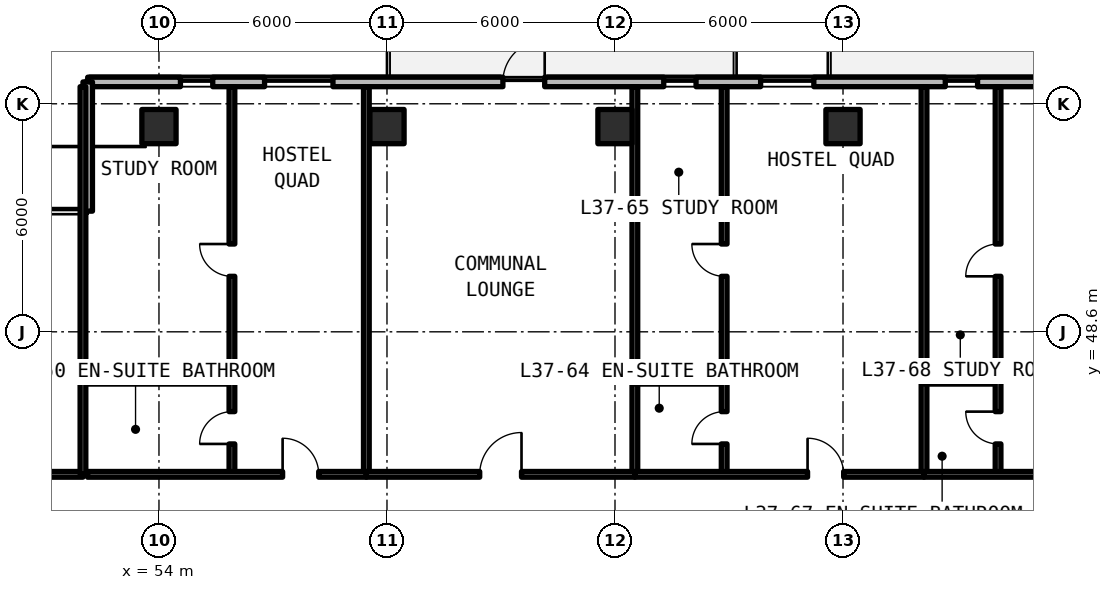
"""IFC4 building model, lengths in metres.
Left out: names, types, materials, properties, quantities, classifications, styles, units other than length and angle.
Written with IfcOpenShell. Run it as: python <this file> out.ifc"""

import sys

from ifc_helpers import new_model, si_unit, direction, frame, frame_2d, origin, origin_2d, place, context, subcontext, project, spatial, rectangle, extrude, element, fill, save


model = new_model("IFC4")
c1 = context("Model", 3, precision=1e-05, world=origin(), true_north=direction((0.0, 1.0)))
c2 = subcontext(c1, "Body", "Model", "MODEL_VIEW")
j1 = project(units=[si_unit("LENGTHUNIT", "METRE"), si_unit("PLANEANGLEUNIT", "RADIAN")], contexts=[c1])
p1 = place(None, origin())
s1 = spatial("IfcSite", under=j1, at=p1, CompositionType="ELEMENT")
p2 = place(p1, origin())
s2 = spatial("IfcBuilding", under=s1, at=p2, CompositionType="ELEMENT")
p3 = place(p2, frame((0.0, 0.0, 135.3)))
s3 = spatial("IfcBuildingStorey", under=s2, at=p3, CompositionType="ELEMENT", Elevation=135.3)
for number, where, z_axis, x_axis in (
    (1, (54.0, 54.0, 0.0), (0.0, 0.0, 1.0), (1.0, 0.0, 0.0)),
    (2, (60.0, 54.0, 0.0), (0.0, 0.0, 1.0), (1.0, 0.0, 0.0)),
    (3, (66.0, 54.0, 0.0), (0.0, 0.0, 1.0), (1.0, 0.0, 0.0)),
    (4, (72.0, 54.0, 0.0), (0.0, 0.0, 1.0), (1.0, 0.0, 0.0)),
):
    element("IfcColumn", number, at=place(p3, frame(where, z_axis=z_axis, x_axis=x_axis)), inside=s3, PredefinedType="COLUMN", context=c2, shape_type="SweptSolid", body=[
        extrude(rectangle(XDim=0.9, YDim=0.9, at=origin_2d()), origin(), (0.0, 0.0, 1.0), 3.3),
    ])
p4 = place(p3, frame((95.748, 55.175, 0.0), z_axis=(0.0, 0.0, 1.0), x_axis=(-1.0, 0.0, 0.0)))
e5 = element("IfcWall", 5, at=p4, inside=s3, PredefinedType="SOLIDWALL", context=c2, shape_type="SweptSolid", body=[
    extrude(rectangle(XDim=43.623, YDim=0.25, at=frame_2d((21.812, 0.0))), origin(), (0.0, 0.0, 1.0), 3.08),
])
p5 = place(p4, frame((31.598, 0.0, 0.0)))
e6 = element("IfcOpeningElement", 6, at=p5, cuts=e5, PredefinedType="OPENING", context=c2, shape_type="SweptSolid", body=[
    extrude(rectangle(XDim=1.1, YDim=2.15, at=frame_2d((0.55, 1.075))), frame((0.0, 0.135, 0.0), z_axis=(0.0, -1.0, 0.0), x_axis=(1.0, 0.0, 0.0)), (0.0, 0.0, 1.0), 0.27),
])
p6 = place(p4, frame((15.398, 0.0, 0.0)))
e7 = element("IfcOpeningElement", 7, at=p6, cuts=e5, PredefinedType="OPENING", context=c2, shape_type="SweptSolid", body=[
    extrude(rectangle(XDim=1.1, YDim=2.15, at=frame_2d((0.55, 1.075))), frame((0.0, 0.135, 0.0), z_axis=(0.0, -1.0, 0.0), x_axis=(1.0, 0.0, 0.0)), (0.0, 0.0, 1.0), 0.27),
])
p7 = place(p4, frame((40.333, 0.0, 0.78)))
e8 = element("IfcOpeningElement", 8, at=p7, cuts=e5, PredefinedType="OPENING", context=c2, shape_type="SweptSolid", body=[
    extrude(rectangle(XDim=0.85, YDim=1.65, at=frame_2d((0.425, 0.825))), frame((0.0, 0.135, 0.0), z_axis=(0.0, -1.0, 0.0), x_axis=(1.0, 0.0, 0.0)), (0.0, 0.0, 1.0), 0.27),
])
p8 = place(p4, frame((37.17, 0.0, 0.78)))
e9 = element("IfcOpeningElement", 9, at=p8, cuts=e5, PredefinedType="OPENING", context=c2, shape_type="SweptSolid", body=[
    extrude(rectangle(XDim=1.8, YDim=1.66, at=frame_2d((0.9, 0.83))), frame((0.0, 0.135, 0.0), z_axis=(0.0, -1.0, 0.0), x_axis=(1.0, 0.0, 0.0)), (0.0, 0.0, 1.0), 0.27),
])
p9 = place(p4, frame((27.615, 0.0, 0.78)))
e10 = element("IfcOpeningElement", 10, at=p9, cuts=e5, PredefinedType="OPENING", context=c2, shape_type="SweptSolid", body=[
    extrude(rectangle(XDim=0.85, YDim=1.65, at=frame_2d((0.425, 0.825))), frame((0.0, 0.135, 0.0), z_axis=(0.0, -1.0, 0.0), x_axis=(1.0, 0.0, 0.0)), (0.0, 0.0, 1.0), 0.27),
])
p10 = place(p4, frame((24.516, 0.0, 0.78)))
e11 = element("IfcOpeningElement", 11, at=p10, cuts=e5, PredefinedType="OPENING", context=c2, shape_type="SweptSolid", body=[
    extrude(rectangle(XDim=1.4, YDim=1.65, at=frame_2d((0.7, 0.825))), frame((0.0, 0.135, 0.0), z_axis=(0.0, -1.0, 0.0), x_axis=(1.0, 0.0, 0.0)), (0.0, 0.0, 1.0), 0.27),
])
p11 = place(p4, frame((20.208, 0.0, 0.78)))
e12 = element("IfcOpeningElement", 12, at=p11, cuts=e5, PredefinedType="OPENING", context=c2, shape_type="SweptSolid", body=[
    extrude(rectangle(XDim=0.85, YDim=1.65, at=frame_2d((0.425, 0.825))), frame((0.0, 0.135, 0.0), z_axis=(0.0, -1.0, 0.0), x_axis=(1.0, 0.0, 0.0)), (0.0, 0.0, 1.0), 0.27),
])
p12 = place(p4, frame((12.6, 0.0, 0.78)))
e13 = element("IfcOpeningElement", 13, at=p12, cuts=e5, PredefinedType="OPENING", context=c2, shape_type="SweptSolid", body=[
    extrude(rectangle(XDim=1.4, YDim=1.65, at=frame_2d((0.7, 0.825))), frame((0.0, 0.135, 0.0), z_axis=(0.0, -1.0, 0.0), x_axis=(1.0, 0.0, 0.0)), (0.0, 0.0, 1.0), 0.27),
])
p13 = place(p4, frame((7.831, 0.0, 0.78)))
e14 = element("IfcOpeningElement", 14, at=p13, cuts=e5, PredefinedType="OPENING", context=c2, shape_type="SweptSolid", body=[
    extrude(rectangle(XDim=1.4, YDim=1.65, at=frame_2d((0.7, 0.825))), frame((0.0, 0.135, 0.0), z_axis=(0.0, -1.0, 0.0), x_axis=(1.0, 0.0, 0.0)), (0.0, 0.0, 1.0), 0.27),
])
p14 = place(p4, frame((4.286, 0.0, 0.78)))
e15 = element("IfcOpeningElement", 15, at=p14, cuts=e5, PredefinedType="OPENING", context=c2, shape_type="SweptSolid", body=[
    extrude(rectangle(XDim=0.85, YDim=1.65, at=frame_2d((0.425, 0.825))), frame((0.0, 0.135, 0.0), z_axis=(0.0, -1.0, 0.0), x_axis=(1.0, 0.0, 0.0)), (0.0, 0.0, 1.0), 0.27),
])
p15 = place(p4, frame((1.098, 0.0, 0.78)))
e16 = element("IfcOpeningElement", 16, at=p15, cuts=e5, PredefinedType="OPENING", context=c2, shape_type="SweptSolid", body=[
    extrude(rectangle(XDim=1.8, YDim=1.66, at=frame_2d((0.9, 0.83))), frame((0.0, 0.135, 0.0), z_axis=(0.0, -1.0, 0.0), x_axis=(1.0, 0.0, 0.0)), (0.0, 0.0, 1.0), 0.27),
])
p16 = place(p3, frame((52.125, 55.175, 0.0), z_axis=(0.0, 0.0, 1.0), x_axis=(0.0, -1.0, 0.0)))
e17 = element("IfcWall", 17, at=p16, inside=s3, PredefinedType="SOLIDWALL", context=c2, shape_type="SweptSolid", body=[
    extrude(rectangle(XDim=3.4, YDim=0.25, at=frame_2d((1.7, 0.0))), origin(), (0.0, 0.0, 1.0), 3.08),
])
p17 = place(p3, frame((43.6, 44.85, 0.0), z_axis=(0.0, 0.0, 1.0), x_axis=(1.0, 0.0, 0.0)))
e18 = element("IfcWall", 18, at=p17, inside=s3, PredefinedType="SOLIDWALL", context=c2, shape_type="SweptSolid", body=[
    extrude(rectangle(XDim=8.4, YDim=0.15, at=frame_2d((4.2, 0.0))), origin(), (0.0, 0.0, 1.0), 2.35),
])
p18 = place(p17, frame((3.65, 0.0, 0.0)))
e19 = element("IfcOpeningElement", 19, at=p18, cuts=e18, PredefinedType="OPENING", context=c2, shape_type="SweptSolid", body=[
    extrude(rectangle(XDim=1.1, YDim=2.15, at=frame_2d((0.55, 1.075))), frame((0.0, 0.085, 0.0), z_axis=(0.0, -1.0, 0.0), x_axis=(1.0, 0.0, 0.0)), (0.0, 0.0, 1.0), 0.17),
])
for number, where, z_axis, x_axis in (
    (20, (52.0, 44.85, 0.0), (0.0, 0.0, 1.0), (0.0, 1.0, 0.0)),
    (21, (59.457, 44.85, 0.0), (0.0, 0.0, 1.0), (0.0, 1.0, 0.0)),
):
    element("IfcWall", number, at=place(p3, frame(where, z_axis=z_axis, x_axis=x_axis)), inside=s3, PredefinedType="SOLIDWALL", context=c2, shape_type="SweptSolid", body=[
        extrude(rectangle(XDim=10.2, YDim=0.15, at=frame_2d((5.1, 0.0))), origin(), (0.0, 0.0, 1.0), 2.35),
    ])
p19 = place(p3, frame((52.12, 47.3, 0.0), z_axis=(0.0, 0.0, 1.0), x_axis=(1.0, 0.0, 0.0)))
e22 = element("IfcWall", 22, at=p19, inside=s3, PredefinedType="PARTITIONING", context=c2, shape_type="SweptSolid", body=[
    extrude(rectangle(XDim=3.8, YDim=0.15, at=frame_2d((1.9, 0.0))), origin(), (0.0, 0.0, 1.0), 2.35),
])
p20 = place(p3, frame((55.92, 44.85, 0.0), z_axis=(0.0, 0.0, 1.0), x_axis=(0.0, 1.0, 0.0)))
e23 = element("IfcWall", 23, at=p20, inside=s3, PredefinedType="PARTITIONING", context=c2, shape_type="SweptSolid", body=[
    extrude(rectangle(XDim=10.2, YDim=0.15, at=frame_2d((5.1, 0.0))), origin(), (0.0, 0.0, 1.0), 2.35),
])
p21 = place(p20, frame((0.8, 0.0, 0.0)))
e24 = element("IfcOpeningElement", 24, at=p21, cuts=e23, PredefinedType="OPENING", context=c2, shape_type="SweptSolid", body=[
    extrude(rectangle(XDim=0.85, YDim=2.1, at=frame_2d((0.425, 1.05))), frame((0.0, 0.085, 0.0), z_axis=(0.0, -1.0, 0.0), x_axis=(1.0, 0.0, 0.0)), (0.0, 0.0, 1.0), 0.17),
])
p22 = place(p20, frame((5.21, 0.0, 0.0)))
e25 = element("IfcOpeningElement", 25, at=p22, cuts=e23, PredefinedType="OPENING", context=c2, shape_type="SweptSolid", body=[
    extrude(rectangle(XDim=0.85, YDim=2.1, at=frame_2d((0.425, 1.05))), frame((0.0, 0.085, 0.0), z_axis=(0.0, -1.0, 0.0), x_axis=(1.0, 0.0, 0.0)), (0.0, 0.0, 1.0), 0.17),
])
p23 = place(p3, frame((52.12, 44.85, 0.0), z_axis=(0.0, 0.0, 1.0), x_axis=(1.0, 0.0, 0.0)))
e26 = element("IfcWall", 26, at=p23, inside=s3, PredefinedType="SOLIDWALL", context=c2, shape_type="SweptSolid", body=[
    extrude(rectangle(XDim=7.337, YDim=0.15, at=frame_2d((3.668, 0.0))), origin(), (0.0, 0.0, 1.0), 2.35),
])
p24 = place(p23, frame((5.134, 0.0, 0.0)))
e27 = element("IfcOpeningElement", 27, at=p24, cuts=e26, PredefinedType="OPENING", context=c2, shape_type="SweptSolid", body=[
    extrude(rectangle(XDim=0.95, YDim=2.15, at=frame_2d((0.475, 1.075))), frame((0.0, 0.085, 0.0), z_axis=(0.0, -1.0, 0.0), x_axis=(1.0, 0.0, 0.0)), (0.0, 0.0, 1.0), 0.17),
])
p25 = place(p3, frame((66.523, 44.85, 0.0), z_axis=(0.0, 0.0, 1.0), x_axis=(0.0, 1.0, 0.0)))
e28 = element("IfcWall", 28, at=p25, inside=s3, PredefinedType="SOLIDWALL", context=c2, shape_type="SweptSolid", body=[
    extrude(rectangle(XDim=10.2, YDim=0.15, at=frame_2d((5.1, 0.0))), origin(), (0.0, 0.0, 1.0), 2.35),
])
p26 = place(p3, frame((59.457, 44.85, 0.0), z_axis=(0.0, 0.0, 1.0), x_axis=(1.0, 0.0, 0.0)))
e29 = element("IfcWall", 29, at=p26, inside=s3, PredefinedType="SOLIDWALL", context=c2, shape_type="SweptSolid", body=[
    extrude(rectangle(XDim=7.065, YDim=0.15, at=frame_2d((3.533, 0.0))), origin(), (0.0, 0.0, 1.0), 2.35),
])
p27 = place(p26, frame((2.983, 0.0, 0.0)))
e30 = element("IfcOpeningElement", 30, at=p27, cuts=e29, PredefinedType="OPENING", context=c2, shape_type="SweptSolid", body=[
    extrude(rectangle(XDim=1.1, YDim=2.15, at=frame_2d((0.55, 1.075))), frame((0.0, 0.085, 0.0), z_axis=(0.0, -1.0, 0.0), x_axis=(1.0, 0.0, 0.0)), (0.0, 0.0, 1.0), 0.17),
])
p28 = place(p3, frame((74.132, 44.85, 0.0), z_axis=(0.0, 0.0, 1.0), x_axis=(0.0, 1.0, 0.0)))
e31 = element("IfcWall", 31, at=p28, inside=s3, PredefinedType="SOLIDWALL", context=c2, shape_type="SweptSolid", body=[
    extrude(rectangle(XDim=10.2, YDim=0.15, at=frame_2d((5.1, 0.0))), origin(), (0.0, 0.0, 1.0), 2.35),
])
p29 = place(p3, frame((66.523, 47.3, 0.0), z_axis=(0.0, 0.0, 1.0), x_axis=(1.0, 0.0, 0.0)))
e32 = element("IfcWall", 32, at=p29, inside=s3, PredefinedType="PARTITIONING", context=c2, shape_type="SweptSolid", body=[
    extrude(rectangle(XDim=2.35, YDim=0.15, at=frame_2d((1.175, 0.0))), origin(), (0.0, 0.0, 1.0), 2.35),
])
p30 = place(p3, frame((68.873, 44.85, 0.0), z_axis=(0.0, 0.0, 1.0), x_axis=(0.0, 1.0, 0.0)))
e33 = element("IfcWall", 33, at=p30, inside=s3, PredefinedType="PARTITIONING", context=c2, shape_type="SweptSolid", body=[
    extrude(rectangle(XDim=10.2, YDim=0.15, at=frame_2d((5.1, 0.0))), origin(), (0.0, 0.0, 1.0), 2.35),
])
p31 = place(p30, frame((0.8, 0.0, 0.0)))
e34 = element("IfcOpeningElement", 34, at=p31, cuts=e33, PredefinedType="OPENING", context=c2, shape_type="SweptSolid", body=[
    extrude(rectangle(XDim=0.85, YDim=2.1, at=frame_2d((0.425, 1.05))), frame((0.0, 0.085, 0.0), z_axis=(0.0, -1.0, 0.0), x_axis=(1.0, 0.0, 0.0)), (0.0, 0.0, 1.0), 0.17),
])
p32 = place(p30, frame((5.21, 0.0, 0.0)))
e35 = element("IfcOpeningElement", 35, at=p32, cuts=e33, PredefinedType="OPENING", context=c2, shape_type="SweptSolid", body=[
    extrude(rectangle(XDim=0.85, YDim=2.1, at=frame_2d((0.425, 1.05))), frame((0.0, 0.085, 0.0), z_axis=(0.0, -1.0, 0.0), x_axis=(1.0, 0.0, 0.0)), (0.0, 0.0, 1.0), 0.17),
])
p33 = place(p3, frame((66.523, 44.85, 0.0), z_axis=(0.0, 0.0, 1.0), x_axis=(1.0, 0.0, 0.0)))
e36 = element("IfcWall", 36, at=p33, inside=s3, PredefinedType="SOLIDWALL", context=c2, shape_type="SweptSolid", body=[
    extrude(rectangle(XDim=7.609, YDim=0.15, at=frame_2d((3.804, 0.0))), origin(), (0.0, 0.0, 1.0), 2.35),
])
p34 = place(p33, frame((4.544, 0.0, 0.0)))
e37 = element("IfcOpeningElement", 37, at=p34, cuts=e36, PredefinedType="OPENING", context=c2, shape_type="SweptSolid", body=[
    extrude(rectangle(XDim=0.95, YDim=2.15, at=frame_2d((0.475, 1.075))), frame((0.0, 0.085, 0.0), z_axis=(0.0, -1.0, 0.0), x_axis=(1.0, 0.0, 0.0)), (0.0, 0.0, 1.0), 0.17),
])
p35 = place(p3, frame((74.132, 47.3, 0.0), z_axis=(0.0, 0.0, 1.0), x_axis=(1.0, 0.0, 0.0)))
e38 = element("IfcWall", 38, at=p35, inside=s3, PredefinedType="PARTITIONING", context=c2, shape_type="SweptSolid", body=[
    extrude(rectangle(XDim=1.948, YDim=0.15, at=frame_2d((0.974, 0.0))), origin(), (0.0, 0.0, 1.0), 2.35),
])
p36 = place(p3, frame((76.08, 44.85, 0.0), z_axis=(0.0, 0.0, 1.0), x_axis=(0.0, 1.0, 0.0)))
e39 = element("IfcWall", 39, at=p36, inside=s3, PredefinedType="PARTITIONING", context=c2, shape_type="SweptSolid", body=[
    extrude(rectangle(XDim=10.2, YDim=0.15, at=frame_2d((5.1, 0.0))), origin(), (0.0, 0.0, 1.0), 2.35),
])
p37 = place(p36, frame((0.8, 0.0, 0.0)))
e40 = element("IfcOpeningElement", 40, at=p37, cuts=e39, PredefinedType="OPENING", context=c2, shape_type="SweptSolid", body=[
    extrude(rectangle(XDim=0.85, YDim=2.1, at=frame_2d((0.425, 1.05))), frame((0.0, 0.085, 0.0), z_axis=(0.0, -1.0, 0.0), x_axis=(1.0, 0.0, 0.0)), (0.0, 0.0, 1.0), 0.17),
])
p38 = place(p36, frame((5.21, 0.0, 0.0)))
e41 = element("IfcOpeningElement", 41, at=p38, cuts=e39, PredefinedType="OPENING", context=c2, shape_type="SweptSolid", body=[
    extrude(rectangle(XDim=0.85, YDim=2.1, at=frame_2d((0.425, 1.05))), frame((0.0, 0.085, 0.0), z_axis=(0.0, -1.0, 0.0), x_axis=(1.0, 0.0, 0.0)), (0.0, 0.0, 1.0), 0.17),
])
p39 = place(p3, frame((74.132, 44.85, 0.0), z_axis=(0.0, 0.0, 1.0), x_axis=(1.0, 0.0, 0.0)))
e42 = element("IfcWall", 42, at=p39, inside=s3, PredefinedType="SOLIDWALL", context=c2, shape_type="SweptSolid", body=[
    extrude(rectangle(XDim=7.066, YDim=0.15, at=frame_2d((3.533, 0.0))), origin(), (0.0, 0.0, 1.0), 2.35),
])
p40 = place(p39, frame((4.072, 0.0, 0.0)))
e43 = element("IfcOpeningElement", 43, at=p40, cuts=e42, PredefinedType="OPENING", context=c2, shape_type="SweptSolid", body=[
    extrude(rectangle(XDim=0.95, YDim=2.15, at=frame_2d((0.475, 1.075))), frame((0.0, 0.085, 0.0), z_axis=(0.0, -1.0, 0.0), x_axis=(1.0, 0.0, 0.0)), (0.0, 0.0, 1.0), 0.17),
])
p41 = place(p5, frame((1.1, 0.0, 0.0), z_axis=(0.0, 0.0, 1.0), x_axis=(-1.0, 0.0, 0.0)))
e44 = element("IfcDoor", 44, at=p41, inside=s3, OperationType="SINGLE_SWING_RIGHT", PredefinedType="DOOR", context=c2, shape_type="SweptSolid", body=[
    extrude(rectangle(XDim=1.1, YDim=2.15, at=frame_2d((0.55, 1.075))), frame((0.0, 0.025, 0.0), z_axis=(0.0, -1.0, 0.0), x_axis=(1.0, 0.0, 0.0)), (0.0, 0.0, 1.0), 0.05),
])
fill(e6, e44)
p42 = place(p7, origin())
e45 = element("IfcWindow", 45, at=p42, inside=s3, PartitioningType="SINGLE_PANEL", PredefinedType="WINDOW", context=c2, shape_type="SweptSolid", body=[
    extrude(rectangle(XDim=0.85, YDim=1.65, at=frame_2d((0.425, 0.825))), frame((0.0, 0.03, 0.0), z_axis=(0.0, -1.0, 0.0), x_axis=(1.0, 0.0, 0.0)), (0.0, 0.0, 1.0), 0.06),
])
fill(e8, e45)
p43 = place(p8, origin())
e46 = element("IfcWindow", 46, at=p43, inside=s3, PartitioningType="SINGLE_PANEL", PredefinedType="WINDOW", context=c2, shape_type="SweptSolid", body=[
    extrude(rectangle(XDim=1.8, YDim=1.66, at=frame_2d((0.9, 0.83))), frame((0.0, 0.03, 0.0), z_axis=(0.0, -1.0, 0.0), x_axis=(1.0, 0.0, 0.0)), (0.0, 0.0, 1.0), 0.06),
])
fill(e9, e46)
p44 = place(p9, origin())
e47 = element("IfcWindow", 47, at=p44, inside=s3, PartitioningType="SINGLE_PANEL", PredefinedType="WINDOW", context=c2, shape_type="SweptSolid", body=[
    extrude(rectangle(XDim=0.85, YDim=1.65, at=frame_2d((0.425, 0.825))), frame((0.0, 0.03, 0.0), z_axis=(0.0, -1.0, 0.0), x_axis=(1.0, 0.0, 0.0)), (0.0, 0.0, 1.0), 0.06),
])
fill(e10, e47)
p45 = place(p10, origin())
e48 = element("IfcWindow", 48, at=p45, inside=s3, PartitioningType="SINGLE_PANEL", PredefinedType="WINDOW", context=c2, shape_type="SweptSolid", body=[
    extrude(rectangle(XDim=1.4, YDim=1.65, at=frame_2d((0.7, 0.825))), frame((0.0, 0.03, 0.0), z_axis=(0.0, -1.0, 0.0), x_axis=(1.0, 0.0, 0.0)), (0.0, 0.0, 1.0), 0.06),
])
fill(e11, e48)
p46 = place(p11, origin())
e49 = element("IfcWindow", 49, at=p46, inside=s3, PartitioningType="SINGLE_PANEL", PredefinedType="WINDOW", context=c2, shape_type="SweptSolid", body=[
    extrude(rectangle(XDim=0.85, YDim=1.65, at=frame_2d((0.425, 0.825))), frame((0.0, 0.03, 0.0), z_axis=(0.0, -1.0, 0.0), x_axis=(1.0, 0.0, 0.0)), (0.0, 0.0, 1.0), 0.06),
])
fill(e12, e49)
p47 = place(p21, origin())
e50 = element("IfcDoor", 50, at=p47, inside=s3, OperationType="SINGLE_SWING_LEFT", PredefinedType="DOOR", context=c2, shape_type="SweptSolid", body=[
    extrude(rectangle(XDim=0.85, YDim=2.1, at=frame_2d((0.425, 1.05))), frame((0.0, 0.025, 0.0), z_axis=(0.0, -1.0, 0.0), x_axis=(1.0, 0.0, 0.0)), (0.0, 0.0, 1.0), 0.05),
])
fill(e24, e50)
p48 = place(p22, origin())
e51 = element("IfcDoor", 51, at=p48, inside=s3, OperationType="SINGLE_SWING_RIGHT", PredefinedType="DOOR", context=c2, shape_type="SweptSolid", body=[
    extrude(rectangle(XDim=0.85, YDim=2.1, at=frame_2d((0.425, 1.05))), frame((0.0, 0.025, 0.0), z_axis=(0.0, -1.0, 0.0), x_axis=(1.0, 0.0, 0.0)), (0.0, 0.0, 1.0), 0.05),
])
fill(e25, e51)
p49 = place(p24, origin())
e52 = element("IfcDoor", 52, at=p49, inside=s3, OperationType="SINGLE_SWING_LEFT", PredefinedType="DOOR", context=c2, shape_type="SweptSolid", body=[
    extrude(rectangle(XDim=0.95, YDim=2.15, at=frame_2d((0.475, 1.075))), frame((0.0, 0.025, 0.0), z_axis=(0.0, -1.0, 0.0), x_axis=(1.0, 0.0, 0.0)), (0.0, 0.0, 1.0), 0.05),
])
fill(e27, e52)
p50 = place(p27, origin())
e53 = element("IfcDoor", 53, at=p50, inside=s3, OperationType="SINGLE_SWING_RIGHT", PredefinedType="DOOR", context=c2, shape_type="SweptSolid", body=[
    extrude(rectangle(XDim=1.1, YDim=2.15, at=frame_2d((0.55, 1.075))), frame((0.0, 0.025, 0.0), z_axis=(0.0, -1.0, 0.0), x_axis=(1.0, 0.0, 0.0)), (0.0, 0.0, 1.0), 0.05),
])
fill(e30, e53)
p51 = place(p31, origin())
e54 = element("IfcDoor", 54, at=p51, inside=s3, OperationType="SINGLE_SWING_LEFT", PredefinedType="DOOR", context=c2, shape_type="SweptSolid", body=[
    extrude(rectangle(XDim=0.85, YDim=2.1, at=frame_2d((0.425, 1.05))), frame((0.0, 0.025, 0.0), z_axis=(0.0, -1.0, 0.0), x_axis=(1.0, 0.0, 0.0)), (0.0, 0.0, 1.0), 0.05),
])
fill(e34, e54)
p52 = place(p32, origin())
e55 = element("IfcDoor", 55, at=p52, inside=s3, OperationType="SINGLE_SWING_RIGHT", PredefinedType="DOOR", context=c2, shape_type="SweptSolid", body=[
    extrude(rectangle(XDim=0.85, YDim=2.1, at=frame_2d((0.425, 1.05))), frame((0.0, 0.025, 0.0), z_axis=(0.0, -1.0, 0.0), x_axis=(1.0, 0.0, 0.0)), (0.0, 0.0, 1.0), 0.05),
])
fill(e35, e55)
p53 = place(p34, origin())
e56 = element("IfcDoor", 56, at=p53, inside=s3, OperationType="SINGLE_SWING_LEFT", PredefinedType="DOOR", context=c2, shape_type="SweptSolid", body=[
    extrude(rectangle(XDim=0.95, YDim=2.15, at=frame_2d((0.475, 1.075))), frame((0.0, 0.025, 0.0), z_axis=(0.0, -1.0, 0.0), x_axis=(1.0, 0.0, 0.0)), (0.0, 0.0, 1.0), 0.05),
])
fill(e37, e56)
p54 = place(p37, origin())
e57 = element("IfcDoor", 57, at=p54, inside=s3, OperationType="SINGLE_SWING_RIGHT", PredefinedType="DOOR", context=c2, shape_type="SweptSolid", body=[
    extrude(rectangle(XDim=0.85, YDim=2.1, at=frame_2d((0.425, 1.05))), frame((0.0, 0.025, 0.0), z_axis=(0.0, -1.0, 0.0), x_axis=(1.0, 0.0, 0.0)), (0.0, 0.0, 1.0), 0.05),
])
fill(e40, e57)
p55 = place(p38, origin())
e58 = element("IfcDoor", 58, at=p55, inside=s3, OperationType="SINGLE_SWING_LEFT", PredefinedType="DOOR", context=c2, shape_type="SweptSolid", body=[
    extrude(rectangle(XDim=0.85, YDim=2.1, at=frame_2d((0.425, 1.05))), frame((0.0, 0.025, 0.0), z_axis=(0.0, -1.0, 0.0), x_axis=(1.0, 0.0, 0.0)), (0.0, 0.0, 1.0), 0.05),
])
fill(e41, e58)
save(model, sys.argv[1])
